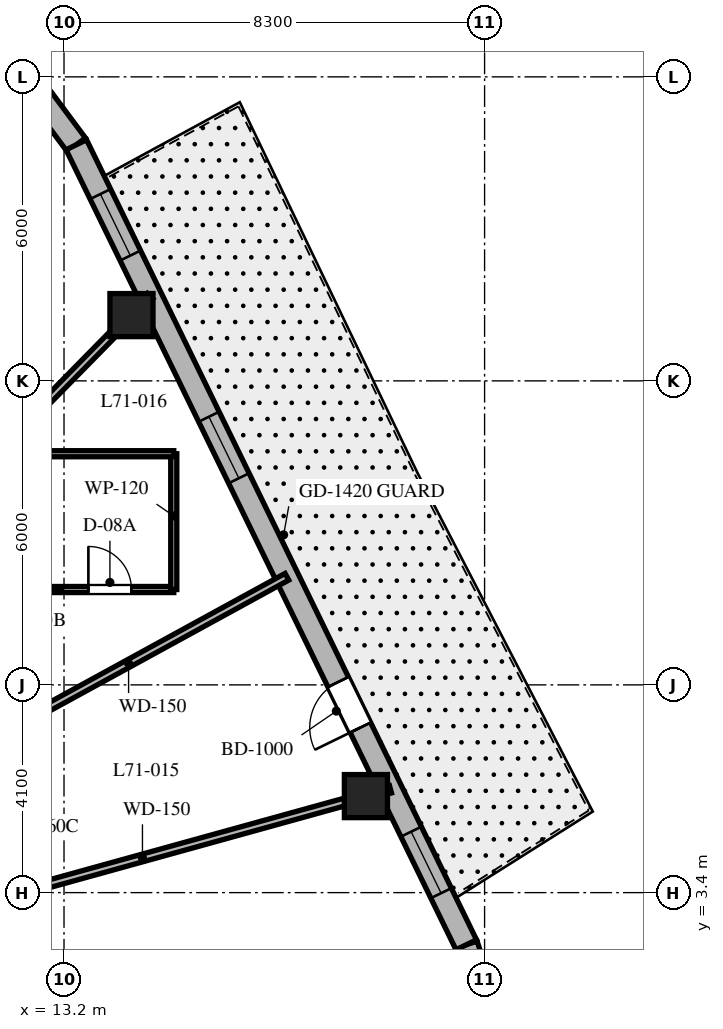
"""IFC4 building model, lengths in metres.
Left out: names, types, materials, properties, quantities, classifications, styles, units other than length and angle.
Written with IfcOpenShell. Run it as: python <this file> out.ifc"""

import sys

from ifc_helpers import new_model, si_unit, direction, frame, frame_2d, origin, origin_2d, place, context, subcontext, project, spatial, rectangle, extrude, element, fill, save


model = new_model("IFC4")
c1 = context("Model", 3, precision=1e-05, world=origin(), true_north=direction((0.0, 1.0)))
c2 = subcontext(c1, "Body", "Model", "MODEL_VIEW")
j1 = project(units=[si_unit("LENGTHUNIT", "METRE"), si_unit("PLANEANGLEUNIT", "RADIAN")], contexts=[c1])
p1 = place(None, origin())
s1 = spatial("IfcSite", under=j1, at=p1, CompositionType="ELEMENT")
p2 = place(p1, origin())
s2 = spatial("IfcBuilding", under=s1, at=p2, CompositionType="ELEMENT")
p3 = place(p2, frame((0.0, 0.0, 284.7)))
s3 = spatial("IfcBuildingStorey", under=s2, at=p3, CompositionType="ELEMENT", Elevation=284.7)
for number, where, z_axis, x_axis in (
    (1, (19.158, 5.305, 0.0), (0.0, 0.0, 1.0), (1.0, 0.0, 0.0)),
    (2, (14.531, 14.798, 0.0), (0.0, 0.0, 1.0), (1.0, 0.0, 0.0)),
):
    element("IfcColumn", number, at=place(p3, frame(where, z_axis=z_axis, x_axis=x_axis)), inside=s3, PredefinedType="COLUMN", context=c2, shape_type="SweptSolid", body=[
        extrude(rectangle(XDim=0.85, YDim=0.85, at=origin_2d()), origin(), (0.0, 0.0, 1.0), 3.9),
    ])
p4 = place(p3, frame((21.422, 1.522, 0.0), z_axis=(0.0, 0.0, 1.0), x_axis=(-0.316964162323, 0.94843751497, 0.0)))
e3 = element("IfcWall", 3, at=p4, inside=s3, PredefinedType="SOLIDWALL", context=c2, shape_type="SweptSolid", body=[
    extrude(rectangle(XDim=0.895, YDim=0.45, at=frame_2d((0.448, 0.0))), origin(), (0.0, 0.0, 1.0), 3.58),
])
p5 = place(p3, frame((13.443, 18.16, 0.0), z_axis=(0.0, 0.0, 1.0), x_axis=(-0.597042425808, 0.802209661987, 0.0)))
e4 = element("IfcWall", 4, at=p5, inside=s3, PredefinedType="SOLIDWALL", context=c2, shape_type="SweptSolid", body=[
    extrude(rectangle(XDim=1.27, YDim=0.45, at=frame_2d((0.635, 0.0))), origin(), (0.0, 0.0, 1.0), 3.58),
])
p6 = place(p3, frame((21.138, 2.371, 0.0), z_axis=(0.0, 0.0, 1.0), x_axis=(-0.438128124058, 0.89891253574, 0.0)))
e5 = element("IfcWall", 5, at=p6, inside=s3, PredefinedType="SOLIDWALL", context=c2, shape_type="SweptSolid", body=[
    extrude(rectangle(XDim=17.565, YDim=0.45, at=frame_2d((8.782, 0.0))), origin(), (0.0, 0.0, 1.0), 3.58),
])
p7 = place(p6, frame((4.769, 0.0, 0.0)))
e6 = element("IfcOpeningElement", 6, at=p7, cuts=e5, PredefinedType="OPENING", context=c2, shape_type="SweptSolid", body=[
    extrude(rectangle(XDim=1.0, YDim=2.15, at=frame_2d((0.5, 1.075))), frame((0.0, 0.235, 0.0), z_axis=(0.0, -1.0, 0.0), x_axis=(1.0, 0.0, 0.0)), (0.0, 0.0, 1.0), 0.47),
])
p8 = place(p6, frame((10.243, 0.0, 0.8)))
e7 = element("IfcOpeningElement", 7, at=p8, cuts=e5, PredefinedType="OPENING", context=c2, shape_type="SweptSolid", body=[
    extrude(rectangle(XDim=1.35, YDim=1.75, at=frame_2d((0.675, 0.875))), frame((0.0, 0.235, 0.0), z_axis=(0.0, -1.0, 0.0), x_axis=(1.0, 0.0, 0.0)), (0.0, 0.0, 1.0), 0.47),
])
p9 = place(p6, frame((15.132, 0.0, 0.8)))
e8 = element("IfcOpeningElement", 8, at=p9, cuts=e5, PredefinedType="OPENING", context=c2, shape_type="SweptSolid", body=[
    extrude(rectangle(XDim=1.35, YDim=1.75, at=frame_2d((0.675, 0.875))), frame((0.0, 0.235, 0.0), z_axis=(0.0, -1.0, 0.0), x_axis=(1.0, 0.0, 0.0)), (0.0, 0.0, 1.0), 0.47),
])
p10 = place(p6, frame((1.133, 0.0, 0.8)))
e9 = element("IfcOpeningElement", 9, at=p10, cuts=e5, PredefinedType="OPENING", context=c2, shape_type="SweptSolid", body=[
    extrude(rectangle(XDim=1.35, YDim=1.75, at=frame_2d((0.675, 0.875))), frame((0.0, 0.235, 0.0), z_axis=(0.0, -1.0, 0.0), x_axis=(1.0, 0.0, 0.0)), (0.0, 0.0, 1.0), 0.47),
])
p11 = place(p3, frame((11.35, 3.143, 0.0), z_axis=(0.0, 0.0, 1.0), x_axis=(0.963731818141, 0.266872596386, 0.0)))
e10 = element("IfcWall", 10, at=p11, inside=s3, PredefinedType="PARTITIONING", context=c2, shape_type="SweptSolid", body=[
    extrude(rectangle(XDim=8.605, YDim=0.15, at=frame_2d((4.302, 0.0))), origin(), (0.0, 0.0, 1.0), 2.92),
])
p12 = place(p3, frame((11.35, 6.213, 0.0), z_axis=(0.0, 0.0, 1.0), x_axis=(0.877157109774, 0.480203503499, 0.0)))
e11 = element("IfcWall", 11, at=p12, inside=s3, PredefinedType="PARTITIONING", context=c2, shape_type="SweptSolid", body=[
    extrude(rectangle(XDim=7.123, YDim=0.15, at=frame_2d((3.562, 0.0))), origin(), (0.0, 0.0, 1.0), 2.92),
])
p13 = place(p3, frame((9.672, 9.85, 0.0), z_axis=(0.0, 0.0, 1.0), x_axis=(0.700629771301, 0.713524998558, 0.0)))
e12 = element("IfcWall", 12, at=p13, inside=s3, PredefinedType="PARTITIONING", context=c2, shape_type="SweptSolid", body=[
    extrude(rectangle(XDim=7.459, YDim=0.15, at=frame_2d((3.73, 0.0))), origin(), (0.0, 0.0, 1.0), 2.92),
])
p14 = place(p3, frame((12.846, 9.382, 0.0), z_axis=(0.0, 0.0, 1.0), x_axis=(1.0, 0.0, 0.0)))
e13 = element("IfcWall", 13, at=p14, inside=s3, PredefinedType="PARTITIONING", context=c2, shape_type="SweptSolid", body=[
    extrude(rectangle(XDim=2.52, YDim=0.12, at=frame_2d((1.26, 0.0))), origin(), (0.0, 0.0, 1.0), 3.106),
])
p15 = place(p14, frame((0.835, 0.0, 0.0)))
e14 = element("IfcOpeningElement", 14, at=p15, cuts=e13, PredefinedType="OPENING", context=c2, shape_type="SweptSolid", body=[
    extrude(rectangle(XDim=0.85, YDim=2.03, at=frame_2d((0.425, 1.015))), frame((0.0, 0.07, 0.0), z_axis=(0.0, -1.0, 0.0), x_axis=(1.0, 0.0, 0.0)), (0.0, 0.0, 1.0), 0.14),
])
p16 = place(p3, frame((15.366, 9.382, 0.0), z_axis=(0.0, 0.0, 1.0), x_axis=(0.0, 1.0, 0.0)))
e15 = element("IfcWall", 15, at=p16, inside=s3, PredefinedType="PARTITIONING", context=c2, shape_type="SweptSolid", body=[
    extrude(rectangle(XDim=2.68, YDim=0.12, at=frame_2d((1.34, 0.0))), origin(), (0.0, 0.0, 1.0), 3.58),
])
p17 = place(p3, frame((15.366, 12.062, 0.0), z_axis=(0.0, 0.0, 1.0), x_axis=(-1.0, 0.0, 0.0)))
e16 = element("IfcWall", 16, at=p17, inside=s3, PredefinedType="PARTITIONING", context=c2, shape_type="SweptSolid", body=[
    extrude(rectangle(XDim=2.52, YDim=0.12, at=frame_2d((1.26, 0.0))), origin(), (0.0, 0.0, 1.0), 3.106),
])
p18 = place(p7, origin())
e17 = element("IfcDoor", 17, at=p18, inside=s3, OperationType="SINGLE_SWING_LEFT", PredefinedType="DOOR", context=c2, shape_type="SweptSolid", body=[
    extrude(rectangle(XDim=1.0, YDim=2.15, at=frame_2d((0.5, 1.075))), frame((0.0, 0.025, 0.0), z_axis=(0.0, -1.0, 0.0), x_axis=(1.0, 0.0, 0.0)), (0.0, 0.0, 1.0), 0.05),
])
fill(e6, e17)
p19 = place(p8, origin())
e18 = element("IfcWindow", 18, at=p19, inside=s3, PartitioningType="SINGLE_PANEL", PredefinedType="WINDOW", context=c2, shape_type="SweptSolid", body=[
    extrude(rectangle(XDim=1.35, YDim=1.75, at=frame_2d((0.675, 0.875))), frame((0.0, 0.03, 0.0), z_axis=(0.0, -1.0, 0.0), x_axis=(1.0, 0.0, 0.0)), (0.0, 0.0, 1.0), 0.06),
])
fill(e7, e18)
p20 = place(p9, origin())
e19 = element("IfcWindow", 19, at=p20, inside=s3, PartitioningType="SINGLE_PANEL", PredefinedType="WINDOW", context=c2, shape_type="SweptSolid", body=[
    extrude(rectangle(XDim=1.35, YDim=1.75, at=frame_2d((0.675, 0.875))), frame((0.0, 0.03, 0.0), z_axis=(0.0, -1.0, 0.0), x_axis=(1.0, 0.0, 0.0)), (0.0, 0.0, 1.0), 0.06),
])
fill(e8, e19)
p21 = place(p10, origin())
e20 = element("IfcWindow", 20, at=p21, inside=s3, PartitioningType="SINGLE_PANEL", PredefinedType="WINDOW", context=c2, shape_type="SweptSolid", body=[
    extrude(rectangle(XDim=1.35, YDim=1.75, at=frame_2d((0.675, 0.875))), frame((0.0, 0.03, 0.0), z_axis=(0.0, -1.0, 0.0), x_axis=(1.0, 0.0, 0.0)), (0.0, 0.0, 1.0), 0.06),
])
fill(e9, e20)
p22 = place(p15, origin())
e21 = element("IfcDoor", 21, at=p22, inside=s3, OperationType="SINGLE_SWING_LEFT", PredefinedType="DOOR", context=c2, shape_type="SweptSolid", body=[
    extrude(rectangle(XDim=0.85, YDim=2.03, at=frame_2d((0.425, 1.015))), frame((0.0, 0.025, 0.0), z_axis=(0.0, -1.0, 0.0), x_axis=(1.0, 0.0, 0.0)), (0.0, 0.0, 1.0), 0.05),
])
fill(e14, e21)
save(model, sys.argv[1])
